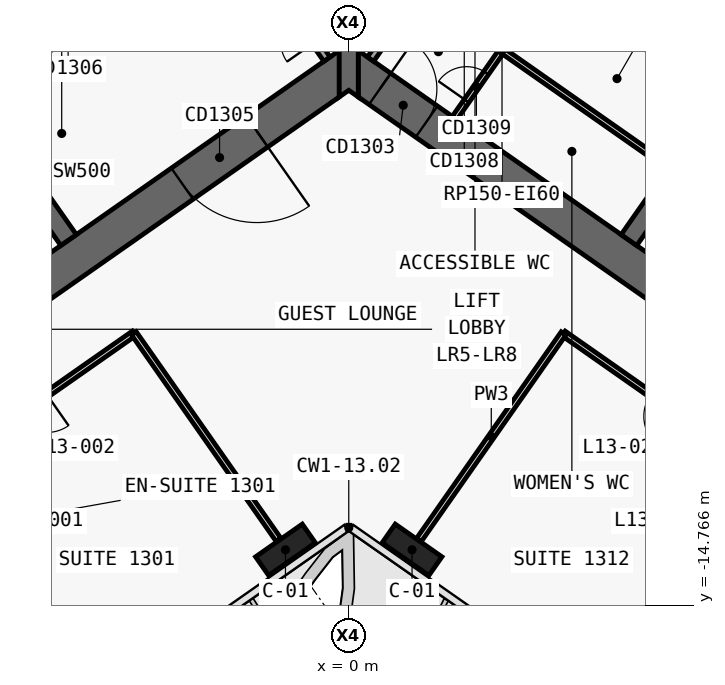
"""IFC4 building model, lengths in metres.
Left out: names, types, materials, properties, quantities, classifications, styles, units other than length and angle.
Written with IfcOpenShell. Run it as: python <this file> out.ifc"""

import sys

from ifc_helpers import new_model, si_unit, direction, frame, frame_2d, origin, origin_2d, place, context, subcontext, project, spatial, polyline, rectangle, outline, extrude, element, fill, save


model = new_model("IFC4")
c1 = context("Model", 3, precision=1e-05, world=origin(), true_north=direction((0.0, 1.0)))
c2 = subcontext(c1, "Body", "Model", "MODEL_VIEW")
j1 = project(units=[si_unit("LENGTHUNIT", "METRE"), si_unit("PLANEANGLEUNIT", "RADIAN")], contexts=[c1])
p1 = place(None, origin())
s1 = spatial("IfcSite", under=j1, at=p1, CompositionType="ELEMENT")
p2 = place(p1, origin())
s2 = spatial("IfcBuilding", under=s1, at=p2, CompositionType="ELEMENT")
p3 = place(p2, frame((0.0, 0.0, 72.5)))
s3 = spatial("IfcBuildingStorey", under=s2, at=p3, CompositionType="ELEMENT", Elevation=72.5)
p4 = place(p3, frame((0.037, 11.867, 0.0), z_axis=(0.0, 0.0, 1.0), x_axis=(-0.819155306259, -0.573571777746, 0.0)))
e1 = element("IfcWall", 1, at=p4, inside=s3, PredefinedType="SHEAR", context=c2, shape_type="SweptSolid", body=[
    extrude(outline(polyline([(33.837, 0.5), (0.7, 0.5), (0.0, -0.5), (33.837, -0.5), (33.837, 0.5)])), origin(), (0.0, 0.0, 1.0), 3.6),
])
p5 = place(p3, frame((0.037, -0.585, 0.0), z_axis=(0.0, 0.0, 1.0), x_axis=(-0.819157152511, -0.573569140985, 0.0)))
e2 = element("IfcWall", 2, at=p5, inside=s3, PredefinedType="SHEAR", context=c2, shape_type="SweptSolid", body=[
    extrude(outline(polyline([(26.695, 0.5), (0.7, 0.5), (0.0, -0.5), (26.695, -0.5), (26.695, 0.5)])), origin(), (0.0, 0.0, 1.0), 3.6),
])
p6 = place(p5, frame((2.995, 0.0, 0.0)))
e3 = element("IfcOpeningElement", 3, at=p6, cuts=e2, PredefinedType="OPENING", context=c2, shape_type="SweptSolid", body=[
    extrude(rectangle(XDim=2.4, YDim=2.1, at=frame_2d((1.2, 1.05))), frame((0.0, 0.51, 0.0), z_axis=(0.0, -1.0, 0.0), x_axis=(1.0, 0.0, 0.0)), (0.0, 0.0, 1.0), 1.02),
])
p7 = place(p5, frame((11.995, 0.0, 0.0)))
e4 = element("IfcOpeningElement", 4, at=p7, cuts=e2, PredefinedType="OPENING", context=c2, shape_type="SweptSolid", body=[
    extrude(rectangle(XDim=2.4, YDim=2.1, at=frame_2d((1.2, 1.05))), frame((0.0, 0.51, 0.0), z_axis=(0.0, -1.0, 0.0), x_axis=(1.0, 0.0, 0.0)), (0.0, 0.0, 1.0), 1.02),
])
p8 = place(p3, frame((-7.372, -5.162, 0.0), z_axis=(0.0, 0.0, 1.0), x_axis=(-0.573594173421, 0.819139624372, 0.0)))
e5 = element("IfcWall", 5, at=p8, inside=s3, PredefinedType="SHEAR", context=c2, shape_type="SweptSolid", body=[
    extrude(outline(polyline([(4.35, 0.25), (0.0, 0.25), (0.0, -0.25), (4.35, -0.25), (4.35, 0.25)])), origin(), (0.0, 0.0, 1.0), 3.6),
])
p9 = place(p3, frame((-2.638, 3.768, 0.0), z_axis=(0.0, 0.0, 1.0), x_axis=(-0.819148977158, -0.573580816643, 0.0)))
e6 = element("IfcWall", 6, at=p9, inside=s3, PredefinedType="SHEAR", context=c2, shape_type="SweptSolid", body=[
    extrude(outline(polyline([(26.0, 0.25), (0.0, 0.25), (0.0, -0.25), (26.0, -0.25), (26.0, 0.25)])), origin(), (0.0, 0.0, 1.0), 3.6),
])
p10 = place(p9, frame((1.169, 0.0, 0.0)))
e7 = element("IfcOpeningElement", 7, at=p10, cuts=e6, PredefinedType="OPENING", context=c2, shape_type="SweptSolid", body=[
    extrude(rectangle(XDim=1.1, YDim=2.1, at=frame_2d((0.55, 1.05))), frame((0.0, 0.26, 0.0), z_axis=(0.0, -1.0, 0.0), x_axis=(1.0, 0.0, 0.0)), (0.0, 0.0, 1.0), 0.52),
])
p11 = place(p9, frame((3.206, 0.0, 0.0)))
e8 = element("IfcOpeningElement", 8, at=p11, cuts=e6, PredefinedType="OPENING", context=c2, shape_type="SweptSolid", body=[
    extrude(rectangle(XDim=1.1, YDim=2.1, at=frame_2d((0.55, 1.05))), frame((0.0, 0.26, 0.0), z_axis=(0.0, -1.0, 0.0), x_axis=(1.0, 0.0, 0.0)), (0.0, 0.0, 1.0), 0.52),
])
p12 = place(p9, frame((5.244, 0.0, 0.0)))
e9 = element("IfcOpeningElement", 9, at=p12, cuts=e6, PredefinedType="OPENING", context=c2, shape_type="SweptSolid", body=[
    extrude(rectangle(XDim=1.1, YDim=2.1, at=frame_2d((0.55, 1.05))), frame((0.0, 0.26, 0.0), z_axis=(0.0, -1.0, 0.0), x_axis=(1.0, 0.0, 0.0)), (0.0, 0.0, 1.0), 0.52),
])
p13 = place(p9, frame((7.281, 0.0, 0.0)))
e10 = element("IfcOpeningElement", 10, at=p13, cuts=e6, PredefinedType="OPENING", context=c2, shape_type="SweptSolid", body=[
    extrude(rectangle(XDim=1.1, YDim=2.1, at=frame_2d((0.55, 1.05))), frame((0.0, 0.26, 0.0), z_axis=(0.0, -1.0, 0.0), x_axis=(1.0, 0.0, 0.0)), (0.0, 0.0, 1.0), 0.52),
])
p14 = place(p9, frame((9.688, 0.0, 0.0)))
e11 = element("IfcOpeningElement", 11, at=p14, cuts=e6, PredefinedType="OPENING", context=c2, shape_type="SweptSolid", body=[
    extrude(rectangle(XDim=1.1, YDim=2.1, at=frame_2d((0.55, 1.05))), frame((0.0, 0.26, 0.0), z_axis=(0.0, -1.0, 0.0), x_axis=(1.0, 0.0, 0.0)), (0.0, 0.0, 1.0), 0.52),
])
p15 = place(p9, frame((11.863, 0.0, 0.0)))
e12 = element("IfcOpeningElement", 12, at=p15, cuts=e6, PredefinedType="OPENING", context=c2, shape_type="SweptSolid", body=[
    extrude(rectangle(XDim=1.1, YDim=2.1, at=frame_2d((0.55, 1.05))), frame((0.0, 0.26, 0.0), z_axis=(0.0, -1.0, 0.0), x_axis=(1.0, 0.0, 0.0)), (0.0, 0.0, 1.0), 0.52),
])
p16 = place(p9, frame((14.038, 0.0, 0.0)))
e13 = element("IfcOpeningElement", 13, at=p16, cuts=e6, PredefinedType="OPENING", context=c2, shape_type="SweptSolid", body=[
    extrude(rectangle(XDim=1.1, YDim=2.1, at=frame_2d((0.55, 1.05))), frame((0.0, 0.26, 0.0), z_axis=(0.0, -1.0, 0.0), x_axis=(1.0, 0.0, 0.0)), (0.0, 0.0, 1.0), 0.52),
])
p17 = place(p9, frame((16.212, 0.0, 0.0)))
e14 = element("IfcOpeningElement", 14, at=p17, cuts=e6, PredefinedType="OPENING", context=c2, shape_type="SweptSolid", body=[
    extrude(rectangle(XDim=1.1, YDim=2.1, at=frame_2d((0.55, 1.05))), frame((0.0, 0.26, 0.0), z_axis=(0.0, -1.0, 0.0), x_axis=(1.0, 0.0, 0.0)), (0.0, 0.0, 1.0), 0.52),
])
p18 = place(p3, frame((-0.037, 11.867, 0.0), z_axis=(0.0, 0.0, 1.0), x_axis=(0.819155306259, -0.573571777746, 0.0)))
e15 = element("IfcWall", 15, at=p18, inside=s3, PredefinedType="SHEAR", context=c2, shape_type="SweptSolid", body=[
    extrude(outline(polyline([(33.837, 0.5), (0.0, 0.5), (0.7, -0.5), (33.837, -0.5), (33.837, 0.5)])), origin(), (0.0, 0.0, 1.0), 3.6),
])
p19 = place(p3, frame((-0.037, -0.585, 0.0), z_axis=(0.0, 0.0, 1.0), x_axis=(0.819157152511, -0.573569140985, 0.0)))
e16 = element("IfcWall", 16, at=p19, inside=s3, PredefinedType="SHEAR", context=c2, shape_type="SweptSolid", body=[
    extrude(outline(polyline([(26.695, 0.5), (0.0, 0.5), (0.7, -0.5), (26.695, -0.5), (26.695, 0.5)])), origin(), (0.0, 0.0, 1.0), 3.6),
])
p20 = place(p19, frame((1.045, 0.0, 0.0)))
e17 = element("IfcOpeningElement", 17, at=p20, cuts=e16, PredefinedType="OPENING", context=c2, shape_type="SweptSolid", body=[
    extrude(rectangle(XDim=1.5, YDim=2.1, at=frame_2d((0.75, 1.05))), frame((0.0, 0.51, 0.0), z_axis=(0.0, -1.0, 0.0), x_axis=(1.0, 0.0, 0.0)), (0.0, 0.0, 1.0), 1.02),
])
p21 = place(p19, frame((12.445, 0.0, 0.0)))
e18 = element("IfcOpeningElement", 18, at=p21, cuts=e16, PredefinedType="OPENING", context=c2, shape_type="SweptSolid", body=[
    extrude(rectangle(XDim=1.5, YDim=2.1, at=frame_2d((0.75, 1.05))), frame((0.0, 0.51, 0.0), z_axis=(0.0, -1.0, 0.0), x_axis=(1.0, 0.0, 0.0)), (0.0, 0.0, 1.0), 1.02),
])
p22 = place(p3, frame((7.372, -5.162, 0.0), z_axis=(0.0, 0.0, 1.0), x_axis=(0.573594173421, 0.819139624372, 0.0)))
e19 = element("IfcWall", 19, at=p22, inside=s3, PredefinedType="SHEAR", context=c2, shape_type="SweptSolid", body=[
    extrude(outline(polyline([(0.0, 0.25), (0.0, -0.25), (4.35, -0.25), (4.35, 0.25), (0.0, 0.25)])), origin(), (0.0, 0.0, 1.0), 3.6),
])
p23 = place(p3, frame((2.638, 3.768, 0.0), z_axis=(0.0, 0.0, 1.0), x_axis=(0.819148977158, -0.573580816643, 0.0)))
e20 = element("IfcWall", 20, at=p23, inside=s3, PredefinedType="SHEAR", context=c2, shape_type="SweptSolid", body=[
    extrude(outline(polyline([(0.0, 0.25), (0.0, -0.25), (26.0, -0.25), (26.0, 0.25), (0.0, 0.25)])), origin(), (0.0, 0.0, 1.0), 3.6),
])
p24 = place(p23, frame((9.637, 0.0, 0.0)))
e21 = element("IfcOpeningElement", 21, at=p24, cuts=e20, PredefinedType="OPENING", context=c2, shape_type="SweptSolid", body=[
    extrude(rectangle(XDim=1.2, YDim=2.1, at=frame_2d((0.6, 1.05))), frame((0.0, 0.26, 0.0), z_axis=(0.0, -1.0, 0.0), x_axis=(1.0, 0.0, 0.0)), (0.0, 0.0, 1.0), 0.52),
])
p25 = place(p23, frame((11.812, 0.0, 0.0)))
e22 = element("IfcOpeningElement", 22, at=p25, cuts=e20, PredefinedType="OPENING", context=c2, shape_type="SweptSolid", body=[
    extrude(rectangle(XDim=1.2, YDim=2.1, at=frame_2d((0.6, 1.05))), frame((0.0, 0.26, 0.0), z_axis=(0.0, -1.0, 0.0), x_axis=(1.0, 0.0, 0.0)), (0.0, 0.0, 1.0), 0.52),
])
p26 = place(p23, frame((13.988, 0.0, 0.0)))
e23 = element("IfcOpeningElement", 23, at=p26, cuts=e20, PredefinedType="OPENING", context=c2, shape_type="SweptSolid", body=[
    extrude(rectangle(XDim=1.2, YDim=2.1, at=frame_2d((0.6, 1.05))), frame((0.0, 0.26, 0.0), z_axis=(0.0, -1.0, 0.0), x_axis=(1.0, 0.0, 0.0)), (0.0, 0.0, 1.0), 0.52),
])
p27 = place(p23, frame((16.262, 0.0, 0.0)))
e24 = element("IfcOpeningElement", 24, at=p27, cuts=e20, PredefinedType="OPENING", context=c2, shape_type="SweptSolid", body=[
    extrude(rectangle(XDim=1.0, YDim=2.1, at=frame_2d((0.5, 1.05))), frame((0.0, 0.26, 0.0), z_axis=(0.0, -1.0, 0.0), x_axis=(1.0, 0.0, 0.0)), (0.0, 0.0, 1.0), 0.52),
])
p28 = place(p3, frame((0.0, -1.396, 0.0), z_axis=(0.0, 0.0, 1.0), x_axis=(0.0, 1.0, 0.0)))
e25 = element("IfcWall", 25, at=p28, inside=s3, PredefinedType="SHEAR", context=c2, shape_type="SweptSolid", body=[
    extrude(outline(polyline([(0.0, -0.25), (0.175, -0.25), (1.221, -0.25), (12.452, -0.25), (13.848, -0.25), (13.857, -0.25), (13.968, -0.172), (13.848, 0.0), (13.968, 0.172), (13.857, 0.25), (13.848, 0.25), (12.452, 0.25), (1.221, 0.25), (0.175, 0.25), (0.0, 0.25), (0.175, 0.0), (0.0, -0.25)])), origin(), (0.0, 0.0, 1.0), 3.6),
])
for number, where, z_axis, x_axis in (
    (26, (-1.665, -13.313, 0.0), (0.0, 0.0, 1.0), (-0.819, -0.574, 0.0)),
    (27, (1.665, -13.313, 0.0), (0.0, 0.0, 1.0), (0.819, -0.574, 0.0)),
):
    element("IfcColumn", number, at=place(p3, frame(where, z_axis=z_axis, x_axis=x_axis)), inside=s3, PredefinedType="COLUMN", context=c2, shape_type="SweptSolid", body=[
        extrude(rectangle(XDim=1.5, YDim=0.6, at=origin_2d()), origin(), (0.0, 0.0, 1.0), 3.6),
    ])
p29 = place(p3, frame((2.785, -1.95, 0.0), z_axis=(0.0, 0.0, 1.0), x_axis=(0.57356780395, 0.819158088694, 0.0)))
e28 = element("IfcWall", 28, at=p29, inside=s3, PredefinedType="PARTITIONING", context=c2, shape_type="SweptSolid", body=[
    extrude(rectangle(XDim=4.35, YDim=0.15, at=frame_2d((2.175, 0.0))), origin(), (0.0, 0.0, 1.0), 3.32),
])
p30 = place(p29, frame((0.55, 0.0, 0.0)))
e29 = element("IfcOpeningElement", 29, at=p30, cuts=e28, PredefinedType="OPENING", context=c2, shape_type="SweptSolid", body=[
    extrude(rectangle(XDim=0.9, YDim=2.1, at=frame_2d((0.45, 1.05))), frame((0.0, 0.085, 0.0), z_axis=(0.0, -1.0, 0.0), x_axis=(1.0, 0.0, 0.0)), (0.0, 0.0, 1.0), 0.17),
])
p31 = place(p29, frame((2.825, 0.0, 0.0)))
e30 = element("IfcOpeningElement", 30, at=p31, cuts=e28, PredefinedType="OPENING", context=c2, shape_type="SweptSolid", body=[
    extrude(rectangle(XDim=0.9, YDim=2.1, at=frame_2d((0.45, 1.05))), frame((0.0, 0.085, 0.0), z_axis=(0.0, -1.0, 0.0), x_axis=(1.0, 0.0, 0.0)), (0.0, 0.0, 1.0), 0.17),
])
p32 = place(p3, frame((4.033, -0.168, 0.0), z_axis=(0.0, 0.0, 1.0), x_axis=(0.819146154531, -0.573584847705, 0.0)))
e31 = element("IfcWall", 31, at=p32, inside=s3, PredefinedType="PARTITIONING", context=c2, shape_type="SweptSolid", body=[
    extrude(rectangle(XDim=5.35, YDim=0.15, at=frame_2d((2.675, 0.0))), origin(), (0.0, 0.0, 1.0), 3.32),
])
p33 = place(p3, frame((-0.573, -0.402, 0.0), z_axis=(0.0, 0.0, 1.0), x_axis=(-0.57356780395, 0.819158088694, 0.0)))
e32 = element("IfcWall", 32, at=p33, inside=s3, PredefinedType="SOLIDWALL", context=c2, shape_type="SweptSolid", body=[
    extrude(rectangle(XDim=4.35, YDim=0.2, at=frame_2d((2.175, 0.0))), origin(), (0.0, 0.0, 1.0), 3.32),
])
p34 = place(p33, frame((0.55, 0.0, 0.0)))
e33 = element("IfcOpeningElement", 33, at=p34, cuts=e32, PredefinedType="OPENING", context=c2, shape_type="SweptSolid", body=[
    extrude(rectangle(XDim=0.9, YDim=2.1, at=frame_2d((0.45, 1.05))), frame((0.0, 0.11, 0.0), z_axis=(0.0, -1.0, 0.0), x_axis=(1.0, 0.0, 0.0)), (0.0, 0.0, 1.0), 0.22),
])
p35 = place(p3, frame((0.573, -0.402, 0.0), z_axis=(0.0, 0.0, 1.0), x_axis=(0.57356780395, 0.819158088694, 0.0)))
e34 = element("IfcWall", 34, at=p35, inside=s3, PredefinedType="SOLIDWALL", context=c2, shape_type="SweptSolid", body=[
    extrude(rectangle(XDim=4.35, YDim=0.2, at=frame_2d((2.175, 0.0))), origin(), (0.0, 0.0, 1.0), 3.32),
])
p36 = place(p35, frame((0.55, 0.0, 0.0)))
e35 = element("IfcOpeningElement", 35, at=p36, cuts=e34, PredefinedType="OPENING", context=c2, shape_type="SweptSolid", body=[
    extrude(rectangle(XDim=0.9, YDim=2.1, at=frame_2d((0.45, 1.05))), frame((0.0, 0.11, 0.0), z_axis=(0.0, -1.0, 0.0), x_axis=(1.0, 0.0, 0.0)), (0.0, 0.0, 1.0), 0.22),
])
p37 = place(p3, frame((11.059, -11.406, 0.0), z_axis=(0.0, 0.0, 1.0), x_axis=(-0.819155459934, 0.573571558274, 0.0)))
e36 = element("IfcWall", 36, at=p37, inside=s3, PredefinedType="PARTITIONING", context=c2, shape_type="SweptSolid", body=[
    extrude(rectangle(XDim=6.601, YDim=0.15, at=frame_2d((3.301, 0.0))), origin(), (0.0, 0.0, 1.0), 2.6),
])
p38 = place(p37, frame((2.801, 0.0, 0.0)))
e37 = element("IfcOpeningElement", 37, at=p38, cuts=e36, PredefinedType="OPENING", context=c2, shape_type="SweptSolid", body=[
    extrude(rectangle(XDim=1.0, YDim=2.1, at=frame_2d((0.5, 1.05))), frame((0.0, 0.085, 0.0), z_axis=(0.0, -1.0, 0.0), x_axis=(1.0, 0.0, 0.0)), (0.0, 0.0, 1.0), 0.17),
])
p39 = place(p3, frame((-5.652, -7.62, 0.0), z_axis=(0.0, 0.0, 1.0), x_axis=(-0.819155459934, -0.573571558274, 0.0)))
e38 = element("IfcWall", 38, at=p39, inside=s3, PredefinedType="PARTITIONING", context=c2, shape_type="SweptSolid", body=[
    extrude(rectangle(XDim=6.601, YDim=0.15, at=frame_2d((3.301, 0.0))), origin(), (0.0, 0.0, 1.0), 2.6),
])
p40 = place(p39, frame((2.8, 0.0, 0.0)))
e39 = element("IfcOpeningElement", 39, at=p40, cuts=e38, PredefinedType="OPENING", context=c2, shape_type="SweptSolid", body=[
    extrude(rectangle(XDim=1.0, YDim=2.1, at=frame_2d((0.5, 1.05))), frame((0.0, 0.085, 0.0), z_axis=(0.0, -1.0, 0.0), x_axis=(1.0, 0.0, 0.0)), (0.0, 0.0, 1.0), 0.17),
])
p41 = place(p3, frame((1.849, -13.051, 0.0), z_axis=(0.0, 0.0, 1.0), x_axis=(0.57357355307, 0.819154063177, 0.0)))
e40 = element("IfcWall", 40, at=p41, inside=s3, PredefinedType="PARTITIONING", context=c2, shape_type="SweptSolid", body=[
    extrude(rectangle(XDim=6.63, YDim=0.15, at=frame_2d((3.315, 0.0))), origin(), (0.0, 0.0, 1.0), 2.6),
])
p42 = place(p3, frame((-1.849, -13.051, 0.0), z_axis=(0.0, 0.0, 1.0), x_axis=(-0.573575988258, 0.819152358047, 0.0)))
e41 = element("IfcWall", 41, at=p42, inside=s3, PredefinedType="PARTITIONING", context=c2, shape_type="SweptSolid", body=[
    extrude(rectangle(XDim=6.632, YDim=0.15, at=frame_2d((3.316, 0.0))), origin(), (0.0, 0.0, 1.0), 2.6),
])
p43 = place(p6, origin())
e42 = element("IfcDoor", 42, at=p43, inside=s3, OperationType="DOUBLE_DOOR_SINGLE_SWING", PredefinedType="DOOR", context=c2, shape_type="SweptSolid", body=[
    extrude(rectangle(XDim=2.4, YDim=2.1, at=frame_2d((1.2, 1.05))), frame((0.0, 0.025, 0.0), z_axis=(0.0, -1.0, 0.0), x_axis=(1.0, 0.0, 0.0)), (0.0, 0.0, 1.0), 0.05),
])
fill(e3, e42)
p44 = place(p30, origin())
e43 = element("IfcDoor", 43, at=p44, inside=s3, OperationType="SINGLE_SWING_RIGHT", PredefinedType="DOOR", context=c2, shape_type="SweptSolid", body=[
    extrude(rectangle(XDim=0.9, YDim=2.1, at=frame_2d((0.45, 1.05))), frame((0.0, 0.025, 0.0), z_axis=(0.0, -1.0, 0.0), x_axis=(1.0, 0.0, 0.0)), (0.0, 0.0, 1.0), 0.05),
])
fill(e29, e43)
p45 = place(p20, origin())
e44 = element("IfcDoor", 44, at=p45, inside=s3, OperationType="SINGLE_SWING_RIGHT", PredefinedType="DOOR", context=c2, shape_type="SweptSolid", body=[
    extrude(rectangle(XDim=1.5, YDim=2.1, at=frame_2d((0.75, 1.05))), frame((0.0, 0.025, 0.0), z_axis=(0.0, -1.0, 0.0), x_axis=(1.0, 0.0, 0.0)), (0.0, 0.0, 1.0), 0.05),
])
fill(e17, e44)
save(model, sys.argv[1])
